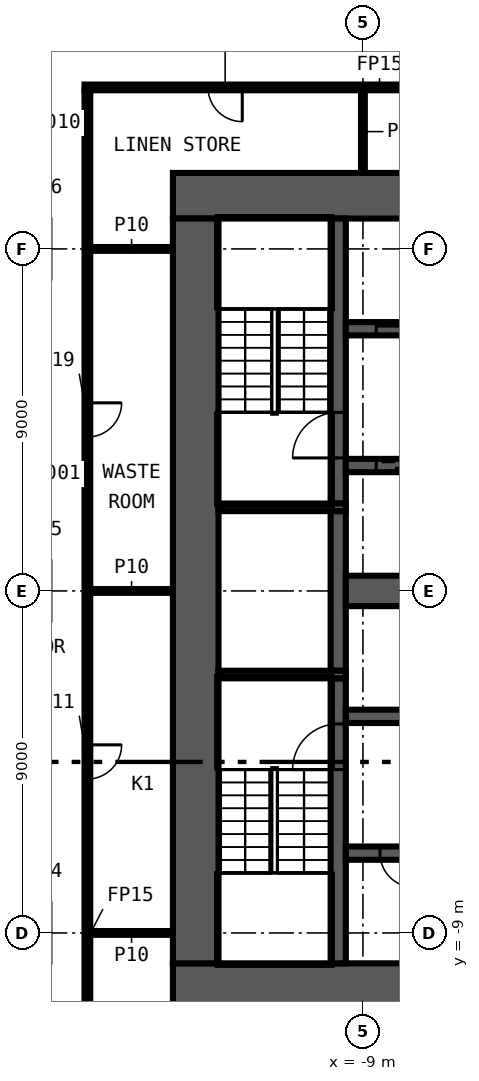
"""IFC4 building model, lengths in metres.
Left out: names, types, materials, properties, quantities, classifications, styles, units other than length and angle.
Written with IfcOpenShell. Run it as: python <this file> out.ifc"""

import sys

from ifc_helpers import new_model, si_unit, direction, frame, frame_2d, origin, place, context, subcontext, project, spatial, rectangle, extrude, element, fill, save


model = new_model("IFC4")
c1 = context("Model", 3, precision=1e-05, world=origin(), true_north=direction((0.0, 1.0)))
c2 = subcontext(c1, "Body", "Model", "MODEL_VIEW")
j1 = project(units=[si_unit("LENGTHUNIT", "METRE"), si_unit("PLANEANGLEUNIT", "RADIAN")], contexts=[c1])
p1 = place(None, origin())
s1 = spatial("IfcSite", under=j1, at=p1, CompositionType="ELEMENT")
p2 = place(p1, origin())
s2 = spatial("IfcBuilding", under=s1, at=p2, CompositionType="ELEMENT")
p3 = place(p2, frame((0.0, 0.0, 38.0)))
s3 = spatial("IfcBuildingStorey", under=s2, at=p3, CompositionType="ELEMENT", Elevation=38.0)
for number, where, z_axis, x_axis in (
    (1, (-16.175, -9.0, 0.0), (0.0, 0.0, 1.0), (1.0, 0.0, 0.0)),
    (2, (-16.175, 0.0, 0.0), (0.0, 0.0, 1.0), (1.0, 0.0, 0.0)),
    (3, (-16.175, 9.0, 0.0), (0.0, 0.0, 1.0), (1.0, 0.0, 0.0)),
):
    element("IfcWall", number, at=place(p3, frame(where, z_axis=z_axis, x_axis=x_axis)), inside=s3, PredefinedType="PARTITIONING", context=c2, shape_type="SweptSolid", body=[
        extrude(rectangle(XDim=2.175, YDim=0.1, at=frame_2d((1.087, 0.0))), origin(), (0.0, 0.0, 1.0), 5.6),
    ])
p4 = place(p3, frame((1.425, 13.25, 0.0), z_axis=(0.0, 0.0, 1.0), x_axis=(-1.0, 0.0, 0.0)))
e4 = element("IfcWall", 4, at=p4, inside=s3, PredefinedType="PARTITIONING", context=c2, shape_type="SweptSolid", body=[
    extrude(rectangle(XDim=17.75, YDim=0.15, at=frame_2d((8.875, 0.0))), origin(), (0.0, 0.0, 1.0), 5.6),
])
p5 = place(p4, frame((5.475, 0.0, 0.0)))
e5 = element("IfcOpeningElement", 5, at=p5, cuts=e4, PredefinedType="OPENING", context=c2, shape_type="SweptSolid", body=[
    extrude(rectangle(XDim=0.9, YDim=2.1, at=frame_2d((0.45, 1.05))), frame((0.0, 0.085, 0.0), z_axis=(0.0, -1.0, 0.0), x_axis=(1.0, 0.0, 0.0)), (0.0, 0.0, 1.0), 0.17),
])
p6 = place(p4, frame((13.6, 0.0, 0.0)))
e6 = element("IfcOpeningElement", 6, at=p6, cuts=e4, PredefinedType="OPENING", context=c2, shape_type="SweptSolid", body=[
    extrude(rectangle(XDim=0.9, YDim=2.1, at=frame_2d((0.45, 1.05))), frame((0.0, 0.085, 0.0), z_axis=(0.0, -1.0, 0.0), x_axis=(1.0, 0.0, 0.0)), (0.0, 0.0, 1.0), 0.17),
])
p7 = place(p3, frame((-9.0, 11.0, 0.0), z_axis=(0.0, 0.0, 1.0), x_axis=(0.0, 1.0, 0.0)))
e7 = element("IfcWall", 7, at=p7, inside=s3, PredefinedType="PARTITIONING", context=c2, shape_type="SweptSolid", body=[
    extrude(rectangle(XDim=2.175, YDim=0.1, at=frame_2d((1.087, 0.0))), origin(), (0.0, 0.0, 1.0), 5.6),
])
p8 = place(p3, frame((-16.25, 13.175, 0.0), z_axis=(0.0, 0.0, 1.0), x_axis=(0.0, -1.0, 0.0)))
e8 = element("IfcWall", 8, at=p8, inside=s3, PredefinedType="PARTITIONING", context=c2, shape_type="SweptSolid", body=[
    extrude(rectangle(XDim=26.35, YDim=0.15, at=frame_2d((13.175, 0.0))), origin(), (0.0, 0.0, 1.0), 5.6),
])
p9 = place(p8, frame((17.225, 0.0, 0.0)))
e9 = element("IfcOpeningElement", 9, at=p9, cuts=e8, PredefinedType="OPENING", context=c2, shape_type="SweptSolid", body=[
    extrude(rectangle(XDim=0.9, YDim=2.1, at=frame_2d((0.45, 1.05))), frame((0.0, 0.085, 0.0), z_axis=(0.0, -1.0, 0.0), x_axis=(1.0, 0.0, 0.0)), (0.0, 0.0, 1.0), 0.17),
])
p10 = place(p8, frame((8.225, 0.0, 0.0)))
e10 = element("IfcOpeningElement", 10, at=p10, cuts=e8, PredefinedType="OPENING", context=c2, shape_type="SweptSolid", body=[
    extrude(rectangle(XDim=0.9, YDim=2.1, at=frame_2d((0.45, 1.05))), frame((0.0, 0.085, 0.0), z_axis=(0.0, -1.0, 0.0), x_axis=(1.0, 0.0, 0.0)), (0.0, 0.0, 1.0), 0.17),
])
p11 = place(p3, frame((-14.0, 10.4, 0.0), z_axis=(0.0, 0.0, 1.0), x_axis=(1.0, 0.0, 0.0)))
e11 = element("IfcWall", 11, at=p11, inside=s3, PredefinedType="SHEAR", context=c2, shape_type="SweptSolid", body=[
    extrude(rectangle(XDim=28.0, YDim=1.2, at=frame_2d((14.0, 0.0))), origin(), (0.0, 0.0, 1.0), 5.6),
])
p12 = place(p11, frame((15.9, 0.0, 0.0)))
e12 = element("IfcOpeningElement", 12, at=p12, cuts=e11, PredefinedType="OPENING", context=c2, shape_type="SweptSolid", body=[
    extrude(rectangle(XDim=1.6, YDim=2.1, at=frame_2d((0.8, 1.05))), frame((0.0, 0.61, 0.0), z_axis=(0.0, -1.0, 0.0), x_axis=(1.0, 0.0, 0.0)), (0.0, 0.0, 1.0), 1.22),
])
p13 = place(p3, frame((14.0, -10.4, 0.0), z_axis=(0.0, 0.0, 1.0), x_axis=(-1.0, 0.0, 0.0)))
e13 = element("IfcWall", 13, at=p13, inside=s3, PredefinedType="SHEAR", context=c2, shape_type="SweptSolid", body=[
    extrude(rectangle(XDim=28.0, YDim=1.2, at=frame_2d((14.0, 0.0))), origin(), (0.0, 0.0, 1.0), 5.6),
])
p14 = place(p13, frame((5.1, 0.0, 0.0)))
e14 = element("IfcOpeningElement", 14, at=p14, cuts=e13, PredefinedType="OPENING", context=c2, shape_type="SweptSolid", body=[
    extrude(rectangle(XDim=1.6, YDim=2.1, at=frame_2d((0.8, 1.05))), frame((0.0, 0.61, 0.0), z_axis=(0.0, -1.0, 0.0), x_axis=(1.0, 0.0, 0.0)), (0.0, 0.0, 1.0), 1.22),
])
p15 = place(p3, frame((-13.4, -9.8, 0.0), z_axis=(0.0, 0.0, 1.0), x_axis=(0.0, 1.0, 0.0)))
e15 = element("IfcWall", 15, at=p15, inside=s3, PredefinedType="SHEAR", context=c2, shape_type="SweptSolid", body=[
    extrude(rectangle(XDim=19.6, YDim=1.2, at=frame_2d((9.8, 0.0))), origin(), (0.0, 0.0, 1.0), 5.6),
])
p16 = place(p3, frame((-9.65, -9.8, 0.0), z_axis=(0.0, 0.0, 1.0), x_axis=(0.0, 1.0, 0.0)))
e16 = element("IfcWall", 16, at=p16, inside=s3, PredefinedType="SHEAR", context=c2, shape_type="SweptSolid", body=[
    extrude(rectangle(XDim=7.5, YDim=0.4, at=frame_2d((3.75, 0.0))), origin(), (0.0, 0.0, 1.0), 5.6),
])
p17 = place(p16, frame((5.1, 0.0, 0.0)))
e17 = element("IfcOpeningElement", 17, at=p17, cuts=e16, PredefinedType="OPENING", context=c2, shape_type="SweptSolid", body=[
    extrude(rectangle(XDim=1.2, YDim=2.1, at=frame_2d((0.6, 1.05))), frame((0.0, 0.21, 0.0), z_axis=(0.0, -1.0, 0.0), x_axis=(1.0, 0.0, 0.0)), (0.0, 0.0, 1.0), 0.42),
])
p18 = place(p3, frame((-9.65, -2.1, 0.0), z_axis=(0.0, 0.0, 1.0), x_axis=(0.0, 1.0, 0.0)))
e18 = element("IfcWall", 18, at=p18, inside=s3, PredefinedType="SHEAR", context=c2, shape_type="SweptSolid", body=[
    extrude(rectangle(XDim=4.2, YDim=0.4, at=frame_2d((2.1, 0.0))), origin(), (0.0, 0.0, 1.0), 5.6),
])
p19 = place(p3, frame((-9.65, 2.3, 0.0), z_axis=(0.0, 0.0, 1.0), x_axis=(0.0, 1.0, 0.0)))
e19 = element("IfcWall", 19, at=p19, inside=s3, PredefinedType="SHEAR", context=c2, shape_type="SweptSolid", body=[
    extrude(rectangle(XDim=7.5, YDim=0.4, at=frame_2d((3.75, 0.0))), origin(), (0.0, 0.0, 1.0), 5.6),
])
p20 = place(p19, frame((1.2, 0.0, 0.0)))
e20 = element("IfcOpeningElement", 20, at=p20, cuts=e19, PredefinedType="OPENING", context=c2, shape_type="SweptSolid", body=[
    extrude(rectangle(XDim=1.2, YDim=2.1, at=frame_2d((0.6, 1.05))), frame((0.0, 0.21, 0.0), z_axis=(0.0, -1.0, 0.0), x_axis=(1.0, 0.0, 0.0)), (0.0, 0.0, 1.0), 0.42),
])
for number, where, z_axis, x_axis in (
    (21, (-9.45, 2.2, 0.0), (0.0, 0.0, 1.0), (-1.0, 0.0, 0.0)),
    (22, (-9.45, -2.2, 0.0), (0.0, 0.0, 1.0), (-1.0, 0.0, 0.0)),
):
    element("IfcWall", number, at=place(p3, frame(where, z_axis=z_axis, x_axis=x_axis)), inside=s3, PredefinedType="SHEAR", context=c2, shape_type="SweptSolid", body=[
        extrude(rectangle(XDim=3.35, YDim=0.2, at=frame_2d((1.675, 0.0))), origin(), (0.0, 0.0, 1.0), 5.6),
    ])
p21 = place(p3, frame((-9.45, 6.9, 0.0), z_axis=(0.0, 0.0, 1.0), x_axis=(1.0, 0.0, 0.0)))
e23 = element("IfcWall", 23, at=p21, inside=s3, PredefinedType="SHEAR", context=c2, shape_type="SweptSolid", body=[
    extrude(rectangle(XDim=18.9, YDim=0.35, at=frame_2d((9.45, 0.0))), origin(), (0.0, 0.0, 1.0), 5.6),
])
p22 = place(p21, frame((0.8, 0.0, 0.0)))
e24 = element("IfcOpeningElement", 24, at=p22, cuts=e23, PredefinedType="OPENING", context=c2, shape_type="SweptSolid", body=[
    extrude(rectangle(XDim=1.1, YDim=2.1, at=frame_2d((0.55, 1.05))), frame((0.0, 0.185, 0.0), z_axis=(0.0, -1.0, 0.0), x_axis=(1.0, 0.0, 0.0)), (0.0, 0.0, 1.0), 0.37),
])
p23 = place(p21, frame((3.5, 0.0, 0.0)))
e25 = element("IfcOpeningElement", 25, at=p23, cuts=e23, PredefinedType="OPENING", context=c2, shape_type="SweptSolid", body=[
    extrude(rectangle(XDim=1.1, YDim=2.1, at=frame_2d((0.55, 1.05))), frame((0.0, 0.185, 0.0), z_axis=(0.0, -1.0, 0.0), x_axis=(1.0, 0.0, 0.0)), (0.0, 0.0, 1.0), 0.37),
])
p24 = place(p21, frame((6.2, 0.0, 0.0)))
e26 = element("IfcOpeningElement", 26, at=p24, cuts=e23, PredefinedType="OPENING", context=c2, shape_type="SweptSolid", body=[
    extrude(rectangle(XDim=1.1, YDim=2.1, at=frame_2d((0.55, 1.05))), frame((0.0, 0.185, 0.0), z_axis=(0.0, -1.0, 0.0), x_axis=(1.0, 0.0, 0.0)), (0.0, 0.0, 1.0), 0.37),
])
p25 = place(p21, frame((8.9, 0.0, 0.0)))
e27 = element("IfcOpeningElement", 27, at=p25, cuts=e23, PredefinedType="OPENING", context=c2, shape_type="SweptSolid", body=[
    extrude(rectangle(XDim=1.1, YDim=2.1, at=frame_2d((0.55, 1.05))), frame((0.0, 0.185, 0.0), z_axis=(0.0, -1.0, 0.0), x_axis=(1.0, 0.0, 0.0)), (0.0, 0.0, 1.0), 0.37),
])
p26 = place(p21, frame((11.55, 0.0, 0.0)))
e28 = element("IfcOpeningElement", 28, at=p26, cuts=e23, PredefinedType="OPENING", context=c2, shape_type="SweptSolid", body=[
    extrude(rectangle(XDim=1.2, YDim=2.1, at=frame_2d((0.6, 1.05))), frame((0.0, 0.185, 0.0), z_axis=(0.0, -1.0, 0.0), x_axis=(1.0, 0.0, 0.0)), (0.0, 0.0, 1.0), 0.37),
])
p27 = place(p21, frame((14.3, 0.0, 0.0)))
e29 = element("IfcOpeningElement", 29, at=p27, cuts=e23, PredefinedType="OPENING", context=c2, shape_type="SweptSolid", body=[
    extrude(rectangle(XDim=1.1, YDim=2.1, at=frame_2d((0.55, 1.05))), frame((0.0, 0.185, 0.0), z_axis=(0.0, -1.0, 0.0), x_axis=(1.0, 0.0, 0.0)), (0.0, 0.0, 1.0), 0.37),
])
p28 = place(p21, frame((17.0, 0.0, 0.0)))
e30 = element("IfcOpeningElement", 30, at=p28, cuts=e23, PredefinedType="OPENING", context=c2, shape_type="SweptSolid", body=[
    extrude(rectangle(XDim=1.1, YDim=2.1, at=frame_2d((0.55, 1.05))), frame((0.0, 0.185, 0.0), z_axis=(0.0, -1.0, 0.0), x_axis=(1.0, 0.0, 0.0)), (0.0, 0.0, 1.0), 0.37),
])
p29 = place(p3, frame((9.45, 3.3, 0.0), z_axis=(0.0, 0.0, 1.0), x_axis=(-1.0, 0.0, 0.0)))
e31 = element("IfcWall", 31, at=p29, inside=s3, PredefinedType="SHEAR", context=c2, shape_type="SweptSolid", body=[
    extrude(rectangle(XDim=18.9, YDim=0.35, at=frame_2d((9.45, 0.0))), origin(), (0.0, 0.0, 1.0), 5.6),
])
p30 = place(p29, frame((17.0, 0.0, 0.0)))
e32 = element("IfcOpeningElement", 32, at=p30, cuts=e31, PredefinedType="OPENING", context=c2, shape_type="SweptSolid", body=[
    extrude(rectangle(XDim=1.1, YDim=2.1, at=frame_2d((0.55, 1.05))), frame((0.0, 0.185, 0.0), z_axis=(0.0, -1.0, 0.0), x_axis=(1.0, 0.0, 0.0)), (0.0, 0.0, 1.0), 0.37),
])
p31 = place(p29, frame((14.3, 0.0, 0.0)))
e33 = element("IfcOpeningElement", 33, at=p31, cuts=e31, PredefinedType="OPENING", context=c2, shape_type="SweptSolid", body=[
    extrude(rectangle(XDim=1.1, YDim=2.1, at=frame_2d((0.55, 1.05))), frame((0.0, 0.185, 0.0), z_axis=(0.0, -1.0, 0.0), x_axis=(1.0, 0.0, 0.0)), (0.0, 0.0, 1.0), 0.37),
])
p32 = place(p29, frame((11.6, 0.0, 0.0)))
e34 = element("IfcOpeningElement", 34, at=p32, cuts=e31, PredefinedType="OPENING", context=c2, shape_type="SweptSolid", body=[
    extrude(rectangle(XDim=1.1, YDim=2.1, at=frame_2d((0.55, 1.05))), frame((0.0, 0.185, 0.0), z_axis=(0.0, -1.0, 0.0), x_axis=(1.0, 0.0, 0.0)), (0.0, 0.0, 1.0), 0.37),
])
p33 = place(p29, frame((8.9, 0.0, 0.0)))
e35 = element("IfcOpeningElement", 35, at=p33, cuts=e31, PredefinedType="OPENING", context=c2, shape_type="SweptSolid", body=[
    extrude(rectangle(XDim=1.1, YDim=2.1, at=frame_2d((0.55, 1.05))), frame((0.0, 0.185, 0.0), z_axis=(0.0, -1.0, 0.0), x_axis=(1.0, 0.0, 0.0)), (0.0, 0.0, 1.0), 0.37),
])
p34 = place(p29, frame((6.2, 0.0, 0.0)))
e36 = element("IfcOpeningElement", 36, at=p34, cuts=e31, PredefinedType="OPENING", context=c2, shape_type="SweptSolid", body=[
    extrude(rectangle(XDim=1.1, YDim=2.1, at=frame_2d((0.55, 1.05))), frame((0.0, 0.185, 0.0), z_axis=(0.0, -1.0, 0.0), x_axis=(1.0, 0.0, 0.0)), (0.0, 0.0, 1.0), 0.37),
])
p35 = place(p29, frame((3.5, 0.0, 0.0)))
e37 = element("IfcOpeningElement", 37, at=p35, cuts=e31, PredefinedType="OPENING", context=c2, shape_type="SweptSolid", body=[
    extrude(rectangle(XDim=1.1, YDim=2.1, at=frame_2d((0.55, 1.05))), frame((0.0, 0.185, 0.0), z_axis=(0.0, -1.0, 0.0), x_axis=(1.0, 0.0, 0.0)), (0.0, 0.0, 1.0), 0.37),
])
p36 = place(p29, frame((0.9, 0.0, 0.0)))
e38 = element("IfcOpeningElement", 38, at=p36, cuts=e31, PredefinedType="OPENING", context=c2, shape_type="SweptSolid", body=[
    extrude(rectangle(XDim=0.9, YDim=2.1, at=frame_2d((0.45, 1.05))), frame((0.0, 0.185, 0.0), z_axis=(0.0, -1.0, 0.0), x_axis=(1.0, 0.0, 0.0)), (0.0, 0.0, 1.0), 0.37),
])
p37 = place(p3, frame((-9.45, -3.3, 0.0), z_axis=(0.0, 0.0, 1.0), x_axis=(1.0, 0.0, 0.0)))
e39 = element("IfcWall", 39, at=p37, inside=s3, PredefinedType="SHEAR", context=c2, shape_type="SweptSolid", body=[
    extrude(rectangle(XDim=18.9, YDim=0.35, at=frame_2d((9.45, 0.0))), origin(), (0.0, 0.0, 1.0), 5.6),
])
p38 = place(p37, frame((17.0, 0.0, 0.0)))
e40 = element("IfcOpeningElement", 40, at=p38, cuts=e39, PredefinedType="OPENING", context=c2, shape_type="SweptSolid", body=[
    extrude(rectangle(XDim=1.1, YDim=2.1, at=frame_2d((0.55, 1.05))), frame((0.0, 0.185, 0.0), z_axis=(0.0, -1.0, 0.0), x_axis=(1.0, 0.0, 0.0)), (0.0, 0.0, 1.0), 0.37),
])
p39 = place(p37, frame((3.6, 0.0, 0.0)))
e41 = element("IfcOpeningElement", 41, at=p39, cuts=e39, PredefinedType="OPENING", context=c2, shape_type="SweptSolid", body=[
    extrude(rectangle(XDim=0.9, YDim=2.1, at=frame_2d((0.45, 1.05))), frame((0.0, 0.185, 0.0), z_axis=(0.0, -1.0, 0.0), x_axis=(1.0, 0.0, 0.0)), (0.0, 0.0, 1.0), 0.37),
])
p40 = place(p37, frame((9.0, 0.0, 0.0)))
e42 = element("IfcOpeningElement", 42, at=p40, cuts=e39, PredefinedType="OPENING", context=c2, shape_type="SweptSolid", body=[
    extrude(rectangle(XDim=0.9, YDim=2.1, at=frame_2d((0.45, 1.05))), frame((0.0, 0.185, 0.0), z_axis=(0.0, -1.0, 0.0), x_axis=(1.0, 0.0, 0.0)), (0.0, 0.0, 1.0), 0.37),
])
p41 = place(p3, frame((9.45, -6.9, 0.0), z_axis=(0.0, 0.0, 1.0), x_axis=(-1.0, 0.0, 0.0)))
e43 = element("IfcWall", 43, at=p41, inside=s3, PredefinedType="SHEAR", context=c2, shape_type="SweptSolid", body=[
    extrude(rectangle(XDim=18.9, YDim=0.35, at=frame_2d((9.45, 0.0))), origin(), (0.0, 0.0, 1.0), 5.6),
])
p42 = place(p41, frame((0.75, 0.0, 0.0)))
e44 = element("IfcOpeningElement", 44, at=p42, cuts=e43, PredefinedType="OPENING", context=c2, shape_type="SweptSolid", body=[
    extrude(rectangle(XDim=1.2, YDim=2.1, at=frame_2d((0.6, 1.05))), frame((0.0, 0.185, 0.0), z_axis=(0.0, -1.0, 0.0), x_axis=(1.0, 0.0, 0.0)), (0.0, 0.0, 1.0), 0.37),
])
p43 = place(p41, frame((17.1, 0.0, 0.0)))
e45 = element("IfcOpeningElement", 45, at=p43, cuts=e43, PredefinedType="OPENING", context=c2, shape_type="SweptSolid", body=[
    extrude(rectangle(XDim=0.9, YDim=2.1, at=frame_2d((0.45, 1.05))), frame((0.0, 0.185, 0.0), z_axis=(0.0, -1.0, 0.0), x_axis=(1.0, 0.0, 0.0)), (0.0, 0.0, 1.0), 0.37),
])
p44 = place(p41, frame((14.4, 0.0, 0.0)))
e46 = element("IfcOpeningElement", 46, at=p44, cuts=e43, PredefinedType="OPENING", context=c2, shape_type="SweptSolid", body=[
    extrude(rectangle(XDim=0.9, YDim=2.1, at=frame_2d((0.45, 1.05))), frame((0.0, 0.185, 0.0), z_axis=(0.0, -1.0, 0.0), x_axis=(1.0, 0.0, 0.0)), (0.0, 0.0, 1.0), 0.37),
])
p45 = place(p41, frame((11.7, 0.0, 0.0)))
e47 = element("IfcOpeningElement", 47, at=p45, cuts=e43, PredefinedType="OPENING", context=c2, shape_type="SweptSolid", body=[
    extrude(rectangle(XDim=0.9, YDim=2.1, at=frame_2d((0.45, 1.05))), frame((0.0, 0.185, 0.0), z_axis=(0.0, -1.0, 0.0), x_axis=(1.0, 0.0, 0.0)), (0.0, 0.0, 1.0), 0.37),
])
p46 = place(p41, frame((9.0, 0.0, 0.0)))
e48 = element("IfcOpeningElement", 48, at=p46, cuts=e43, PredefinedType="OPENING", context=c2, shape_type="SweptSolid", body=[
    extrude(rectangle(XDim=0.9, YDim=2.1, at=frame_2d((0.45, 1.05))), frame((0.0, 0.185, 0.0), z_axis=(0.0, -1.0, 0.0), x_axis=(1.0, 0.0, 0.0)), (0.0, 0.0, 1.0), 0.37),
])
p47 = place(p3, frame((-9.45, 0.0, 0.0), z_axis=(0.0, 0.0, 1.0), x_axis=(1.0, 0.0, 0.0)))
e49 = element("IfcWall", 49, at=p47, inside=s3, PredefinedType="SHEAR", context=c2, shape_type="SweptSolid", body=[
    extrude(rectangle(XDim=18.9, YDim=0.8, at=frame_2d((9.45, 0.0))), origin(), (0.0, 0.0, 1.0), 5.6),
])
p48 = place(p9, origin())
e50 = element("IfcDoor", 50, at=p48, inside=s3, OperationType="SINGLE_SWING_RIGHT", PredefinedType="DOOR", context=c2, shape_type="SweptSolid", body=[
    extrude(rectangle(XDim=0.9, YDim=2.1, at=frame_2d((0.45, 1.05))), frame((0.0, 0.025, 0.0), z_axis=(0.0, -1.0, 0.0), x_axis=(1.0, 0.0, 0.0)), (0.0, 0.0, 1.0), 0.05),
])
fill(e9, e50)
p49 = place(p6, origin())
e51 = element("IfcDoor", 51, at=p49, inside=s3, OperationType="SINGLE_SWING_LEFT", PredefinedType="DOOR", context=c2, shape_type="SweptSolid", body=[
    extrude(rectangle(XDim=0.9, YDim=2.1, at=frame_2d((0.45, 1.05))), frame((0.0, 0.025, 0.0), z_axis=(0.0, -1.0, 0.0), x_axis=(1.0, 0.0, 0.0)), (0.0, 0.0, 1.0), 0.05),
])
fill(e6, e51)
p50 = place(p10, origin())
e52 = element("IfcDoor", 52, at=p50, inside=s3, OperationType="SINGLE_SWING_RIGHT", PredefinedType="DOOR", context=c2, shape_type="SweptSolid", body=[
    extrude(rectangle(XDim=0.9, YDim=2.1, at=frame_2d((0.45, 1.05))), frame((0.0, 0.025, 0.0), z_axis=(0.0, -1.0, 0.0), x_axis=(1.0, 0.0, 0.0)), (0.0, 0.0, 1.0), 0.05),
])
fill(e10, e52)
p51 = place(p22, origin())
e53 = element("IfcDoor", 53, at=p51, inside=s3, OperationType="DOUBLE_DOOR_SLIDING", PredefinedType="DOOR", context=c2, shape_type="SweptSolid", body=[
    extrude(rectangle(XDim=1.1, YDim=2.1, at=frame_2d((0.55, 1.05))), frame((0.0, 0.025, 0.0), z_axis=(0.0, -1.0, 0.0), x_axis=(1.0, 0.0, 0.0)), (0.0, 0.0, 1.0), 0.05),
])
fill(e24, e53)
p52 = place(p30, origin())
e54 = element("IfcDoor", 54, at=p52, inside=s3, OperationType="DOUBLE_DOOR_SLIDING", PredefinedType="DOOR", context=c2, shape_type="SweptSolid", body=[
    extrude(rectangle(XDim=1.1, YDim=2.1, at=frame_2d((0.55, 1.05))), frame((0.0, 0.025, 0.0), z_axis=(0.0, -1.0, 0.0), x_axis=(1.0, 0.0, 0.0)), (0.0, 0.0, 1.0), 0.05),
])
fill(e32, e54)
p53 = place(p43, origin())
e55 = element("IfcDoor", 55, at=p53, inside=s3, OperationType="SINGLE_SWING_RIGHT", PredefinedType="DOOR", context=c2, shape_type="SweptSolid", body=[
    extrude(rectangle(XDim=0.9, YDim=2.1, at=frame_2d((0.45, 1.05))), frame((0.0, 0.025, 0.0), z_axis=(0.0, -1.0, 0.0), x_axis=(1.0, 0.0, 0.0)), (0.0, 0.0, 1.0), 0.05),
])
fill(e45, e55)
p54 = place(p20, origin())
e56 = element("IfcDoor", 56, at=p54, inside=s3, OperationType="SINGLE_SWING_RIGHT", PredefinedType="DOOR", context=c2, shape_type="SweptSolid", body=[
    extrude(rectangle(XDim=1.2, YDim=2.1, at=frame_2d((0.6, 1.05))), frame((0.0, 0.025, 0.0), z_axis=(0.0, -1.0, 0.0), x_axis=(1.0, 0.0, 0.0)), (0.0, 0.0, 1.0), 0.05),
])
fill(e20, e56)
p55 = place(p17, origin())
e57 = element("IfcDoor", 57, at=p55, inside=s3, OperationType="SINGLE_SWING_LEFT", PredefinedType="DOOR", context=c2, shape_type="SweptSolid", body=[
    extrude(rectangle(XDim=1.2, YDim=2.1, at=frame_2d((0.6, 1.05))), frame((0.0, 0.025, 0.0), z_axis=(0.0, -1.0, 0.0), x_axis=(1.0, 0.0, 0.0)), (0.0, 0.0, 1.0), 0.05),
])
fill(e17, e57)
save(model, sys.argv[1])
